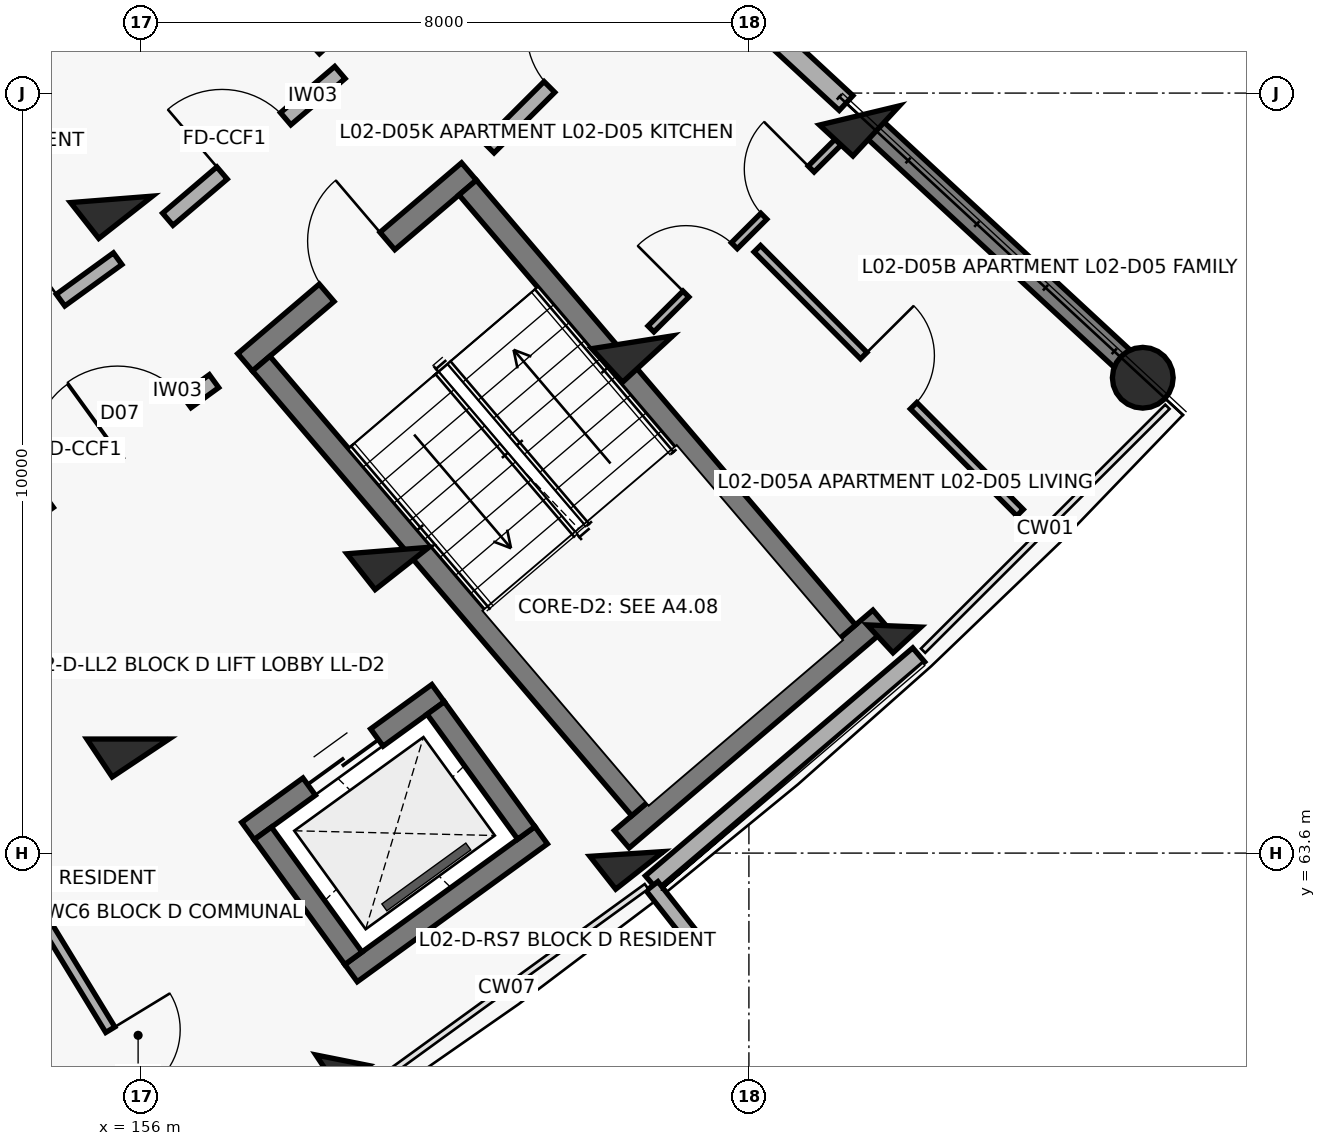
"""IFC4 building model, lengths in metres.
Left out: names, types, materials, properties, quantities, classifications, styles, units other than length and angle.
Written with IfcOpenShell. Run it as: python <this file> out.ifc"""

import sys

from ifc_helpers import new_model, si_unit, direction, frame, frame_2d, origin, origin_2d, place, context, subcontext, project, spatial, rectangle, circle, extrude, element, fill, save


model = new_model("IFC4")
c1 = context("Model", 3, precision=1e-05, world=origin(), true_north=direction((0.0, 1.0)))
c2 = subcontext(c1, "Body", "Model", "MODEL_VIEW")
j1 = project(units=[si_unit("LENGTHUNIT", "METRE"), si_unit("PLANEANGLEUNIT", "RADIAN")], contexts=[c1])
p1 = place(None, origin())
s1 = spatial("IfcSite", under=j1, at=p1, CompositionType="ELEMENT")
p2 = place(p1, origin())
s2 = spatial("IfcBuilding", under=s1, at=p2, CompositionType="ELEMENT")
p3 = place(p2, frame((0.0, 0.0, 8.1)))
s3 = spatial("IfcBuildingStorey", under=s2, at=p3, CompositionType="ELEMENT", Elevation=8.1)
p4 = place(p3, frame((155.831, 65.101, 0.0), z_axis=(0.0, 0.0, 1.0), x_axis=(0.554844427448, -0.83195412213, 0.0)))
e1 = element("IfcColumn", 1, at=p4, inside=s3, PredefinedType="COLUMN", context=c2, shape_type="SweptSolid", body=[
    extrude(rectangle(XDim=0.6, YDim=0.9, at=origin_2d()), origin(), (0.0, 0.0, 1.0), 3.1),
])
p5 = place(p3, frame((158.649, 60.875, 0.0), z_axis=(0.0, 0.0, 1.0), x_axis=(0.554844427448, -0.83195412213, 0.0)))
e2 = element("IfcColumn", 2, at=p5, inside=s3, PredefinedType="COLUMN", context=c2, shape_type="SweptSolid", body=[
    extrude(rectangle(XDim=0.5, YDim=0.5, at=origin_2d()), origin(), (0.0, 0.0, 1.0), 3.1),
])
for number, where, z_axis, x_axis in (
    (3, (155.614, 72.202, 0.0), (0.0, 0.0, 1.0), (0.618, -0.786, 0.0)),
    (4, (159.25, 67.581, 0.0), (0.0, 0.0, 1.0), (0.618, -0.786, 0.0)),
):
    element("IfcColumn", number, at=place(p3, frame(where, z_axis=z_axis, x_axis=x_axis)), inside=s3, PredefinedType="COLUMN", context=c2, shape_type="SweptSolid", body=[
        extrude(rectangle(XDim=0.6, YDim=0.9, at=origin_2d()), origin(), (0.0, 0.0, 1.0), 3.1),
    ])
p6 = place(p3, frame((162.392, 63.589, 0.0), z_axis=(0.0, 0.0, 1.0), x_axis=(0.618408395358, -0.785856893175, 0.0)))
e5 = element("IfcColumn", 5, at=p6, inside=s3, PredefinedType="COLUMN", context=c2, shape_type="SweptSolid", body=[
    extrude(rectangle(XDim=0.55, YDim=0.8, at=origin_2d()), origin(), (0.0, 0.0, 1.0), 3.1),
])
for number, where, z_axis, x_axis in (
    (6, (158.477, 74.643, 0.0), (0.0, 0.0, 1.0), (0.678, -0.735, 0.0)),
    (7, (162.465, 70.322, 0.0), (0.0, 0.0, 1.0), (0.678, -0.735, 0.0)),
):
    element("IfcColumn", number, at=place(p3, frame(where, z_axis=z_axis, x_axis=x_axis)), inside=s3, PredefinedType="COLUMN", context=c2, shape_type="SweptSolid", body=[
        extrude(rectangle(XDim=0.6, YDim=0.9, at=origin_2d()), origin(), (0.0, 0.0, 1.0), 3.1),
    ])
p7 = place(p3, frame((165.91, 66.588, 0.0), z_axis=(0.0, 0.0, 1.0), x_axis=(0.678159669868, -0.73491459515, 0.0)))
e8 = element("IfcColumn", 8, at=p7, inside=s3, PredefinedType="COLUMN", context=c2, shape_type="SweptSolid", body=[
    extrude(rectangle(XDim=0.5, YDim=0.5, at=origin_2d()), origin(), (0.0, 0.0, 1.0), 3.1),
])
p8 = place(p3, frame((165.455, 73.306, 0.0), z_axis=(0.0, 0.0, 1.0), x_axis=(0.733729864503, -0.679441304262, 0.0)))
e9 = element("IfcColumn", 9, at=p8, inside=s3, PredefinedType="COLUMN", context=c2, shape_type="SweptSolid", body=[
    extrude(rectangle(XDim=0.6, YDim=0.9, at=origin_2d()), origin(), (0.0, 0.0, 1.0), 3.1),
])
p9 = place(p3, frame((169.182, 69.854, 0.0), z_axis=(0.0, 0.0, 1.0), x_axis=(0.733729864503, -0.679441304262, 0.0)))
e10 = element("IfcColumn", 10, at=p9, inside=s3, PredefinedType="COLUMN", context=c2, shape_type="SweptSolid", body=[
    extrude(circle(Radius=0.4, at=origin_2d()), origin(), (0.0, 0.0, 1.0), 3.1),
])
p10 = place(p3, frame((165.587, 73.184, 0.0), z_axis=(0.0, 0.0, 1.0), x_axis=(0.733739663667, -0.679430721974, 0.0)))
e11 = element("IfcWall", 11, at=p10, inside=s3, PredefinedType="SHEAR", context=c2, shape_type="SweptSolid", body=[
    extrude(rectangle(XDim=4.72, YDim=0.31, at=frame_2d((2.36, 0.0))), origin(), (0.0, 0.0, 1.0), 2.86),
])
p11 = place(p3, frame((162.716, 63.209, 0.0), z_axis=(0.0, 0.0, 1.0), x_axis=(0.760968923704, 0.64878833001, 0.0)))
e12 = element("IfcWall", 12, at=p11, inside=s3, PredefinedType="SOLIDWALL", context=c2, shape_type="SweptSolid", body=[
    extrude(rectangle(XDim=4.623, YDim=0.242, at=frame_2d((2.311, 0.0))), origin(), (0.0, 0.0, 1.0), 2.25),
])
p12 = place(p3, frame((162.726, 63.164, 0.0), z_axis=(0.0, 0.0, 1.0), x_axis=(0.618456270212, -0.785819217019, 0.0)))
e13 = element("IfcWall", 13, at=p12, inside=s3, PredefinedType="PARAPET", context=c2, shape_type="SweptSolid", body=[
    extrude(rectangle(XDim=0.9, YDim=0.195, at=frame_2d((0.45, 0.0))), origin(), (0.0, 0.0, 1.0), 2.25),
])
p13 = place(p3, frame((159.262, 79.041, 0.0), z_axis=(0.0, 0.0, 1.0), x_axis=(0.733738684326, -0.679431779595, 0.0)))
e14 = element("IfcWall", 14, at=p13, inside=s3, PredefinedType="SOLIDWALL", context=c2, shape_type="SweptSolid", body=[
    extrude(rectangle(XDim=8.2, YDim=0.265, at=frame_2d((4.1, 0.0))), origin(), (0.0, 0.0, 1.0), 2.08),
])
p14 = place(p13, frame((3.59, 0.0, 0.75)))
e15 = element("IfcOpeningElement", 15, at=p14, cuts=e14, PredefinedType="OPENING", context=c2, shape_type="SweptSolid", body=[
    extrude(rectangle(XDim=1.35, YDim=1.35, at=frame_2d((0.675, 0.675))), frame((0.0, 0.142, 0.0), z_axis=(0.0, -1.0, 0.0), x_axis=(1.0, 0.0, 0.0)), (0.0, 0.0, 1.0), 0.285),
])
p15 = place(p3, frame((157.372, 70.058, 0.0), z_axis=(0.0, 0.0, 1.0), x_axis=(0.760990583254, 0.648762924495, 0.0)))
e16 = element("IfcWall", 16, at=p15, inside=s3, PredefinedType="SHEAR", context=c2, shape_type="SweptSolid", body=[
    extrude(rectangle(XDim=3.87, YDim=0.3, at=frame_2d((1.935, 0.0))), origin(), (0.0, 0.0, 1.0), 3.1),
])
p16 = place(p15, frame((1.41, 0.0, 0.0)))
e17 = element("IfcOpeningElement", 17, at=p16, cuts=e16, PredefinedType="OPENING", context=c2, shape_type="SweptSolid", body=[
    extrude(rectangle(XDim=1.05, YDim=2.15, at=frame_2d((0.525, 1.075))), frame((0.0, 0.16, 0.0), z_axis=(0.0, -1.0, 0.0), x_axis=(1.0, 0.0, 0.0)), (0.0, 0.0, 1.0), 0.32),
])
p17 = place(p3, frame((162.327, 63.783, 0.0), z_axis=(0.0, 0.0, 1.0), x_axis=(0.760969560012, 0.648787583678, 0.0)))
e18 = element("IfcWall", 18, at=p17, inside=s3, PredefinedType="SHEAR", context=c2, shape_type="SweptSolid", body=[
    extrude(rectangle(XDim=4.47, YDim=0.3, at=frame_2d((2.235, 0.0))), origin(), (0.0, 0.0, 1.0), 3.1),
])
p18 = place(p3, frame((157.583, 70.041, 0.0), z_axis=(0.0, 0.0, 1.0), x_axis=(0.648762810187, -0.760990680704, 0.0)))
e19 = element("IfcWall", 19, at=p18, inside=s3, PredefinedType="SHEAR", context=c2, shape_type="SweptSolid", body=[
    extrude(rectangle(XDim=7.69, YDim=0.3, at=frame_2d((3.845, 0.0))), origin(), (0.0, 0.0, 1.0), 3.1),
])
p19 = place(p3, frame((160.3, 72.357, 0.0), z_axis=(0.0, 0.0, 1.0), x_axis=(0.648781194888, -0.760975006922, 0.0)))
e20 = element("IfcWall", 20, at=p19, inside=s3, PredefinedType="SHEAR", context=c2, shape_type="SweptSolid", body=[
    extrude(rectangle(XDim=7.69, YDim=0.3, at=frame_2d((3.845, 0.0))), origin(), (0.0, 0.0, 1.0), 3.1),
])
p20 = place(p3, frame((157.409, 63.89, 0.0), z_axis=(0.0, 0.0, 1.0), x_axis=(0.809510936031, 0.587104798521, 0.0)))
e21 = element("IfcWall", 21, at=p20, inside=s3, PredefinedType="SHEAR", context=c2, shape_type="SweptSolid", body=[
    extrude(rectangle(XDim=3.09, YDim=0.28, at=frame_2d((1.545, 0.0))), origin(), (0.0, 0.0, 1.0), 3.1),
])
p21 = place(p20, frame((0.995, 0.0, 0.0)))
e22 = element("IfcOpeningElement", 22, at=p21, cuts=e21, PredefinedType="OPENING", context=c2, shape_type="SweptSolid", body=[
    extrude(rectangle(XDim=1.1, YDim=2.15, at=frame_2d((0.55, 1.075))), frame((0.0, 0.15, 0.0), z_axis=(0.0, -1.0, 0.0), x_axis=(1.0, 0.0, 0.0)), (0.0, 0.0, 1.0), 0.3),
])
p22 = place(p3, frame((158.765, 62.021, 0.0), z_axis=(0.0, 0.0, 1.0), x_axis=(0.809548485838, 0.587053020669, 0.0)))
e23 = element("IfcWall", 23, at=p22, inside=s3, PredefinedType="SHEAR", context=c2, shape_type="SweptSolid", body=[
    extrude(rectangle(XDim=3.09, YDim=0.28, at=frame_2d((1.545, 0.0))), origin(), (0.0, 0.0, 1.0), 3.1),
])
p23 = place(p3, frame((157.604, 63.859, 0.0), z_axis=(0.0, 0.0, 1.0), x_axis=(0.587127188998, -0.809494696671, 0.0)))
e24 = element("IfcWall", 24, at=p23, inside=s3, PredefinedType="SHEAR", context=c2, shape_type="SweptSolid", body=[
    extrude(rectangle(XDim=2.03, YDim=0.28, at=frame_2d((1.015, 0.0))), origin(), (0.0, 0.0, 1.0), 3.1),
])
p24 = place(p3, frame((159.879, 65.509, 0.0), z_axis=(0.0, 0.0, 1.0), x_axis=(0.58704837408, -0.809551855344, 0.0)))
e25 = element("IfcWall", 25, at=p24, inside=s3, PredefinedType="SHEAR", context=c2, shape_type="SweptSolid", body=[
    extrude(rectangle(XDim=2.03, YDim=0.28, at=frame_2d((1.015, 0.0))), origin(), (0.0, 0.0, 1.0), 3.1),
])
p25 = place(p3, frame((152.448, 66.442, 0.0), z_axis=(0.0, 0.0, 1.0), x_axis=(0.520511872578, -0.853854431683, 0.0)))
e26 = element("IfcWall", 26, at=p25, inside=s3, PredefinedType="PARTITIONING", context=c2, shape_type="SweptSolid", body=[
    extrude(rectangle(XDim=7.95, YDim=0.14, at=frame_2d((3.975, 0.0))), origin(), (0.0, 0.0, 1.0), 2.08),
])
p26 = place(p25, frame((6.05, 0.0, 0.0)))
e27 = element("IfcOpeningElement", 27, at=p26, cuts=e26, PredefinedType="OPENING", context=c2, shape_type="SweptSolid", body=[
    extrude(rectangle(XDim=0.92, YDim=2.1, at=frame_2d((0.46, 1.05))), frame((0.0, 0.08, 0.0), z_axis=(0.0, -1.0, 0.0), x_axis=(1.0, 0.0, 0.0)), (0.0, 0.0, 1.0), 0.16),
])
p27 = place(p3, frame((154.423, 67.968, 0.0), z_axis=(0.0, 0.0, 1.0), x_axis=(0.809516127005, 0.587097641043, 0.0)))
e28 = element("IfcWall", 28, at=p27, inside=s3, PredefinedType="SOLIDWALL", context=c2, shape_type="SweptSolid", body=[
    extrude(rectangle(XDim=3.137, YDim=0.21, at=frame_2d((1.569, 0.0))), origin(), (0.0, 0.0, 1.0), 2.08),
])
p28 = place(p27, frame((0.45, 0.0, 0.0)))
e29 = element("IfcOpeningElement", 29, at=p28, cuts=e28, PredefinedType="OPENING", context=c2, shape_type="SweptSolid", body=[
    extrude(rectangle(XDim=1.1, YDim=2.15, at=frame_2d((0.55, 1.075))), frame((0.0, 0.115, 0.0), z_axis=(0.0, -1.0, 0.0), x_axis=(1.0, 0.0, 0.0)), (0.0, 0.0, 1.0), 0.23),
])
p29 = place(p27, frame((1.567, 0.0, 0.0)))
e30 = element("IfcOpeningElement", 30, at=p29, cuts=e28, PredefinedType="OPENING", context=c2, shape_type="SweptSolid", body=[
    extrude(rectangle(XDim=1.12, YDim=2.15, at=frame_2d((0.56, 1.075))), frame((0.0, 0.115, 0.0), z_axis=(0.0, -1.0, 0.0), x_axis=(1.0, 0.0, 0.0)), (0.0, 0.0, 1.0), 0.23),
])
p30 = place(p3, frame((153.285, 69.674, 0.0), z_axis=(0.0, 0.0, 1.0), x_axis=(0.809505174959, 0.587112741911, 0.0)))
e31 = element("IfcWall", 31, at=p30, inside=s3, PredefinedType="SOLIDWALL", context=c2, shape_type="SweptSolid", body=[
    extrude(rectangle(XDim=2.976, YDim=0.19, at=frame_2d((1.488, 0.0))), origin(), (0.0, 0.0, 1.0), 2.08),
])
p31 = place(p30, frame((0.928, 0.0, 0.0)))
e32 = element("IfcOpeningElement", 32, at=p31, cuts=e31, PredefinedType="OPENING", context=c2, shape_type="SweptSolid", body=[
    extrude(rectangle(XDim=1.12, YDim=2.15, at=frame_2d((0.56, 1.075))), frame((0.0, 0.105, 0.0), z_axis=(0.0, -1.0, 0.0), x_axis=(1.0, 0.0, 0.0)), (0.0, 0.0, 1.0), 0.21),
])
p32 = place(p3, frame((156.354, 71.94, 0.0), z_axis=(0.0, 0.0, 1.0), x_axis=(0.760991187621, 0.648762215579, 0.0)))
e33 = element("IfcWall", 33, at=p32, inside=s3, PredefinedType="SOLIDWALL", context=c2, shape_type="SweptSolid", body=[
    extrude(rectangle(XDim=2.976, YDim=0.21, at=frame_2d((1.488, 0.0))), origin(), (0.0, 0.0, 1.0), 2.08),
])
p33 = place(p32, frame((0.938, 0.0, 0.0)))
e34 = element("IfcOpeningElement", 34, at=p33, cuts=e33, PredefinedType="OPENING", context=c2, shape_type="SweptSolid", body=[
    extrude(rectangle(XDim=1.1, YDim=2.15, at=frame_2d((0.55, 1.075))), frame((0.0, 0.115, 0.0), z_axis=(0.0, -1.0, 0.0), x_axis=(1.0, 0.0, 0.0)), (0.0, 0.0, 1.0), 0.23),
])
p34 = place(p3, frame((160.576, 72.884, 0.0), z_axis=(0.0, 0.0, 1.0), x_axis=(0.70773973846, 0.706473256822, 0.0)))
e35 = element("IfcWall", 35, at=p34, inside=s3, PredefinedType="SOLIDWALL", context=c2, shape_type="SweptSolid", body=[
    extrude(rectangle(XDim=3.277, YDim=0.2, at=frame_2d((1.639, 0.0))), origin(), (0.0, 0.0, 1.0), 2.08),
])
p35 = place(p34, frame((1.128, 0.0, 0.0)))
e36 = element("IfcOpeningElement", 36, at=p35, cuts=e35, PredefinedType="OPENING", context=c2, shape_type="SweptSolid", body=[
    extrude(rectangle(XDim=1.02, YDim=2.15, at=frame_2d((0.51, 1.075))), frame((0.0, 0.11, 0.0), z_axis=(0.0, -1.0, 0.0), x_axis=(1.0, 0.0, 0.0)), (0.0, 0.0, 1.0), 0.22),
])
p36 = place(p3, frame((162.711, 70.497, 0.0), z_axis=(0.0, 0.0, 1.0), x_axis=(0.70774573777, 0.706467246706, 0.0)))
e37 = element("IfcWall", 37, at=p36, inside=s3, PredefinedType="PARTITIONING", context=c2, shape_type="SweptSolid", body=[
    extrude(rectangle(XDim=3.628, YDim=0.11, at=frame_2d((1.814, 0.0))), origin(), (0.0, 0.0, 1.0), 2.08),
])
p37 = place(p36, frame((0.65, 0.0, 0.0)))
e38 = element("IfcOpeningElement", 38, at=p37, cuts=e37, PredefinedType="OPENING", context=c2, shape_type="SweptSolid", body=[
    extrude(rectangle(XDim=0.9, YDim=2.1, at=frame_2d((0.45, 1.05))), frame((0.0, 0.065, 0.0), z_axis=(0.0, -1.0, 0.0), x_axis=(1.0, 0.0, 0.0)), (0.0, 0.0, 1.0), 0.13),
])
p38 = place(p36, frame((2.098, 0.0, 0.0)))
e39 = element("IfcOpeningElement", 39, at=p38, cuts=e37, PredefinedType="OPENING", context=c2, shape_type="SweptSolid", body=[
    extrude(rectangle(XDim=0.88, YDim=2.1, at=frame_2d((0.44, 1.05))), frame((0.0, 0.065, 0.0), z_axis=(0.0, -1.0, 0.0), x_axis=(1.0, 0.0, 0.0)), (0.0, 0.0, 1.0), 0.13),
])
p39 = place(p3, frame((164.11, 71.552, 0.0), z_axis=(0.0, 0.0, 1.0), x_axis=(0.705460671411, -0.708749067789, 0.0)))
e40 = element("IfcWall", 40, at=p39, inside=s3, PredefinedType="PARTITIONING", context=c2, shape_type="SweptSolid", body=[
    extrude(rectangle(XDim=4.9, YDim=0.12, at=frame_2d((2.45, 0.0))), origin(), (0.0, 0.0, 1.0), 2.08),
])
p40 = place(p39, frame((1.985, 0.0, 0.0)))
e41 = element("IfcOpeningElement", 41, at=p40, cuts=e40, PredefinedType="OPENING", context=c2, shape_type="SweptSolid", body=[
    extrude(rectangle(XDim=0.93, YDim=2.1, at=frame_2d((0.465, 1.05))), frame((0.0, 0.07, 0.0), z_axis=(0.0, -1.0, 0.0), x_axis=(1.0, 0.0, 0.0)), (0.0, 0.0, 1.0), 0.14),
])
p41 = place(p16, origin())
e42 = element("IfcDoor", 42, at=p41, inside=s3, OperationType="SINGLE_SWING_RIGHT", PredefinedType="DOOR", context=c2, shape_type="SweptSolid", body=[
    extrude(rectangle(XDim=1.05, YDim=2.15, at=frame_2d((0.525, 1.075))), frame((0.0, 0.025, 0.0), z_axis=(0.0, -1.0, 0.0), x_axis=(1.0, 0.0, 0.0)), (0.0, 0.0, 1.0), 0.05),
])
fill(e17, e42)
p42 = place(p21, origin())
e43 = element("IfcDoor", 43, at=p42, inside=s3, OperationType="DOUBLE_DOOR_SLIDING", PredefinedType="DOOR", context=c2, shape_type="SweptSolid", body=[
    extrude(rectangle(XDim=1.1, YDim=2.15, at=frame_2d((0.55, 1.075))), frame((0.0, 0.025, 0.0), z_axis=(0.0, -1.0, 0.0), x_axis=(1.0, 0.0, 0.0)), (0.0, 0.0, 1.0), 0.05),
])
fill(e22, e43)
p43 = place(p26, origin())
e44 = element("IfcDoor", 44, at=p43, inside=s3, OperationType="SINGLE_SWING_LEFT", PredefinedType="DOOR", context=c2, shape_type="SweptSolid", body=[
    extrude(rectangle(XDim=0.92, YDim=2.1, at=frame_2d((0.46, 1.05))), frame((0.0, 0.025, 0.0), z_axis=(0.0, -1.0, 0.0), x_axis=(1.0, 0.0, 0.0)), (0.0, 0.0, 1.0), 0.05),
])
fill(e27, e44)
p44 = place(p28, origin())
e45 = element("IfcDoor", 45, at=p44, inside=s3, OperationType="SINGLE_SWING_RIGHT", PredefinedType="DOOR", context=c2, shape_type="SweptSolid", body=[
    extrude(rectangle(XDim=1.1, YDim=2.15, at=frame_2d((0.55, 1.075))), frame((0.0, 0.025, 0.0), z_axis=(0.0, -1.0, 0.0), x_axis=(1.0, 0.0, 0.0)), (0.0, 0.0, 1.0), 0.05),
])
fill(e29, e45)
p45 = place(p29, origin())
e46 = element("IfcDoor", 46, at=p45, inside=s3, OperationType="SINGLE_SWING_LEFT", PredefinedType="DOOR", context=c2, shape_type="SweptSolid", body=[
    extrude(rectangle(XDim=1.12, YDim=2.15, at=frame_2d((0.56, 1.075))), frame((0.0, 0.025, 0.0), z_axis=(0.0, -1.0, 0.0), x_axis=(1.0, 0.0, 0.0)), (0.0, 0.0, 1.0), 0.05),
])
fill(e30, e46)
p46 = place(p31, origin())
e47 = element("IfcDoor", 47, at=p46, inside=s3, OperationType="SINGLE_SWING_RIGHT", PredefinedType="DOOR", context=c2, shape_type="SweptSolid", body=[
    extrude(rectangle(XDim=1.12, YDim=2.15, at=frame_2d((0.56, 1.075))), frame((0.0, 0.025, 0.0), z_axis=(0.0, -1.0, 0.0), x_axis=(1.0, 0.0, 0.0)), (0.0, 0.0, 1.0), 0.05),
])
fill(e32, e47)
p47 = place(p33, origin())
e48 = element("IfcDoor", 48, at=p47, inside=s3, OperationType="SINGLE_SWING_LEFT", PredefinedType="DOOR", context=c2, shape_type="SweptSolid", body=[
    extrude(rectangle(XDim=1.1, YDim=2.15, at=frame_2d((0.55, 1.075))), frame((0.0, 0.025, 0.0), z_axis=(0.0, -1.0, 0.0), x_axis=(1.0, 0.0, 0.0)), (0.0, 0.0, 1.0), 0.05),
])
fill(e34, e48)
p48 = place(p35, origin())
e49 = element("IfcDoor", 49, at=p48, inside=s3, OperationType="SINGLE_SWING_RIGHT", PredefinedType="DOOR", context=c2, shape_type="SweptSolid", body=[
    extrude(rectangle(XDim=1.02, YDim=2.15, at=frame_2d((0.51, 1.075))), frame((0.0, 0.025, 0.0), z_axis=(0.0, -1.0, 0.0), x_axis=(1.0, 0.0, 0.0)), (0.0, 0.0, 1.0), 0.05),
])
fill(e36, e49)
p49 = place(p37, origin())
e50 = element("IfcDoor", 50, at=p49, inside=s3, OperationType="SINGLE_SWING_LEFT", PredefinedType="DOOR", context=c2, shape_type="SweptSolid", body=[
    extrude(rectangle(XDim=0.9, YDim=2.1, at=frame_2d((0.45, 1.05))), frame((0.0, 0.025, 0.0), z_axis=(0.0, -1.0, 0.0), x_axis=(1.0, 0.0, 0.0)), (0.0, 0.0, 1.0), 0.05),
])
fill(e38, e50)
p50 = place(p38, origin())
e51 = element("IfcDoor", 51, at=p50, inside=s3, OperationType="SINGLE_SWING_RIGHT", PredefinedType="DOOR", context=c2, shape_type="SweptSolid", body=[
    extrude(rectangle(XDim=0.88, YDim=2.1, at=frame_2d((0.44, 1.05))), frame((0.0, 0.025, 0.0), z_axis=(0.0, -1.0, 0.0), x_axis=(1.0, 0.0, 0.0)), (0.0, 0.0, 1.0), 0.05),
])
fill(e39, e51)
p51 = place(p40, origin())
e52 = element("IfcDoor", 52, at=p51, inside=s3, OperationType="SINGLE_SWING_LEFT", PredefinedType="DOOR", context=c2, shape_type="SweptSolid", body=[
    extrude(rectangle(XDim=0.93, YDim=2.1, at=frame_2d((0.465, 1.05))), frame((0.0, 0.025, 0.0), z_axis=(0.0, -1.0, 0.0), x_axis=(1.0, 0.0, 0.0)), (0.0, 0.0, 1.0), 0.05),
])
fill(e41, e52)
save(model, sys.argv[1])
